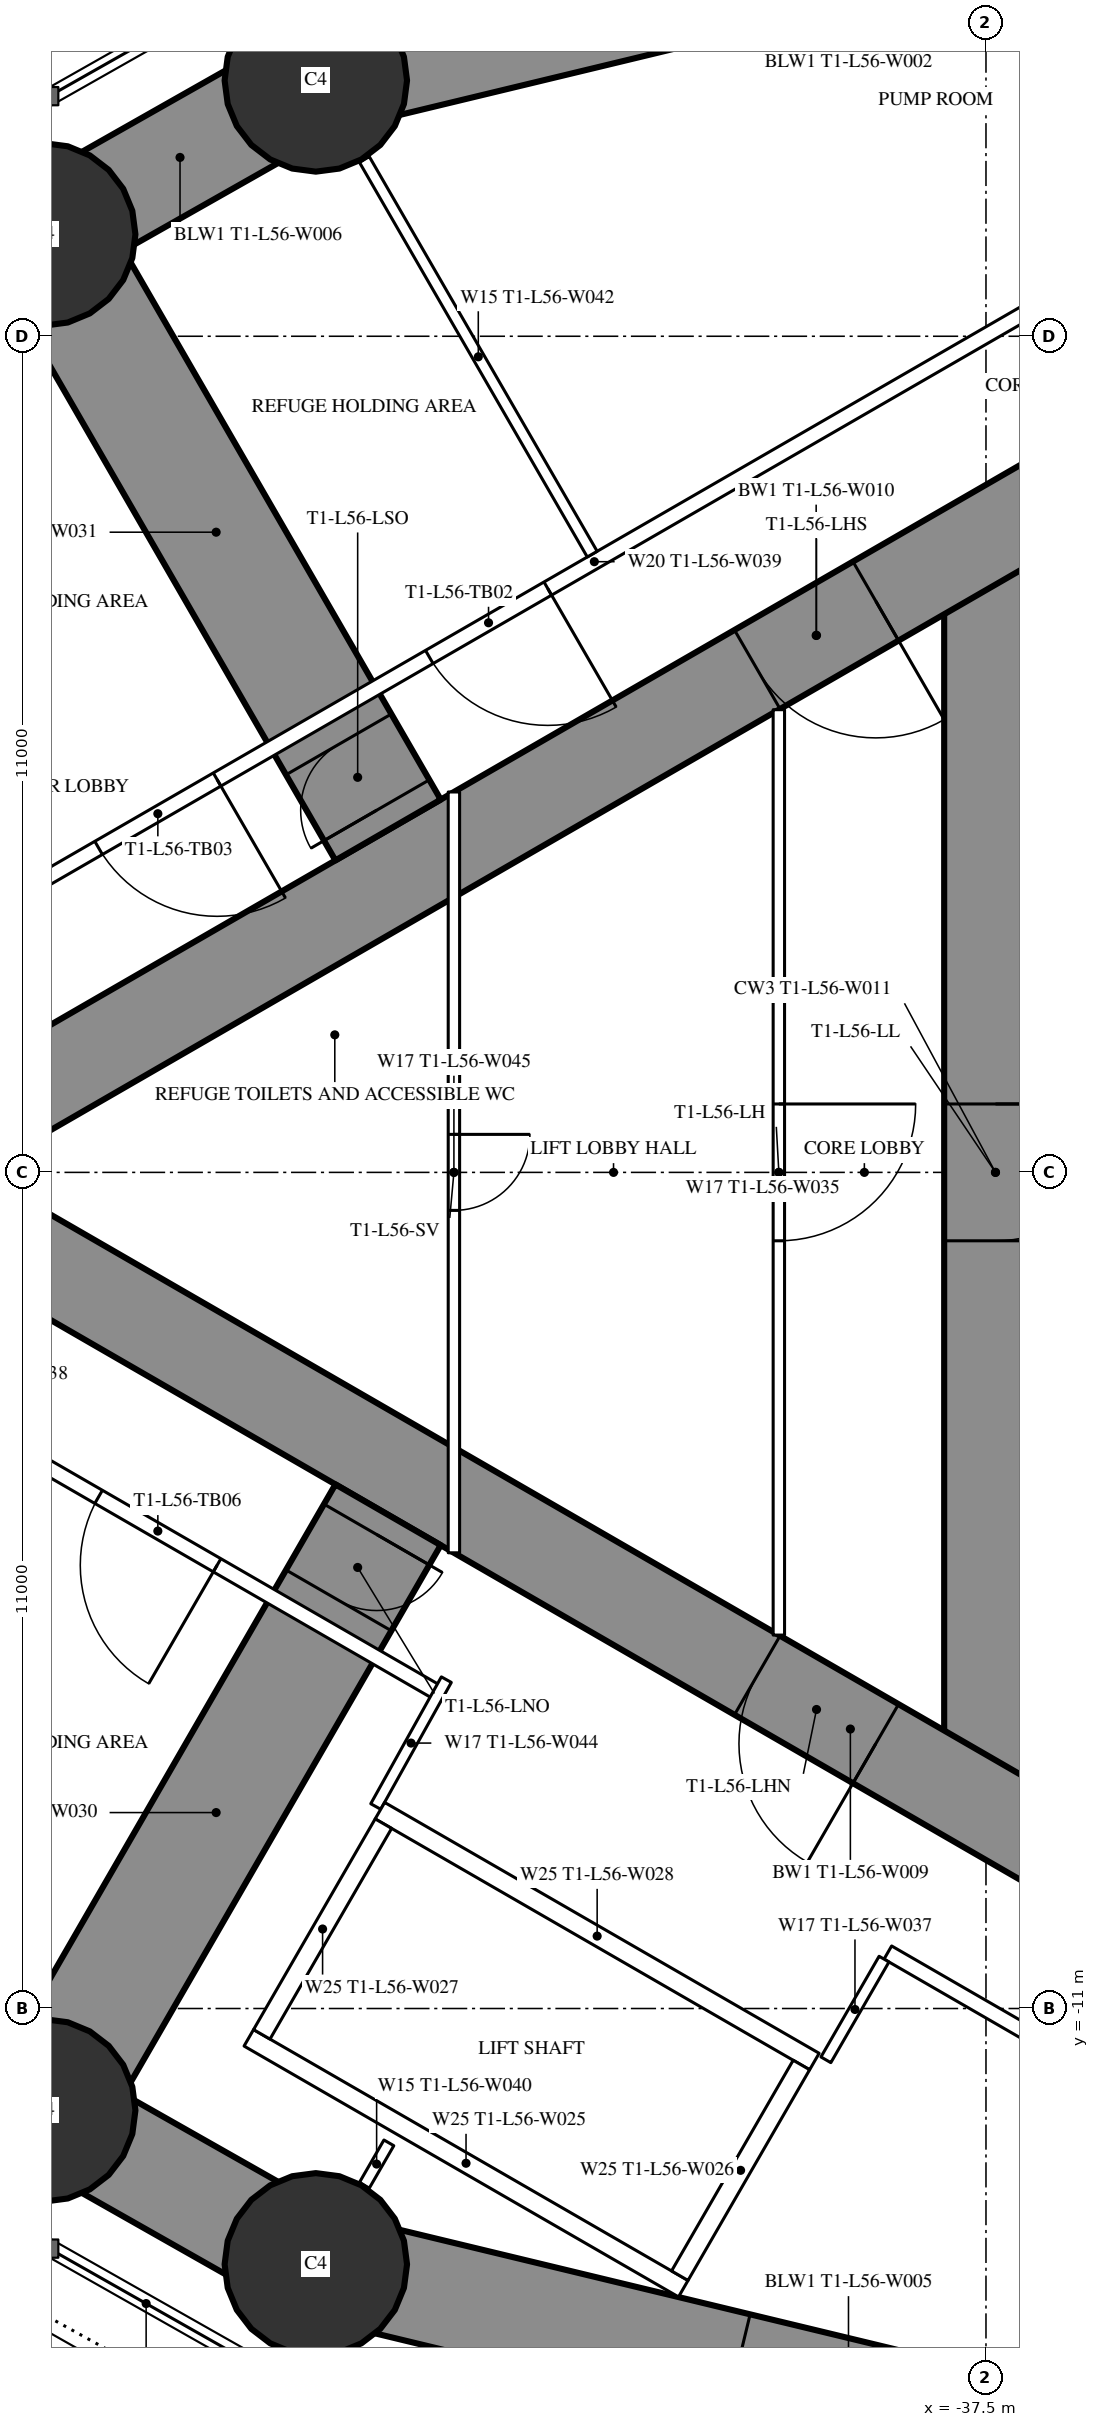
"""IFC4 building model, lengths in metres.
Left out: names, types, materials, properties, quantities, classifications, styles, units other than length and angle.
Written with IfcOpenShell. Run it as: python <this file> out.ifc"""

import sys

from ifc_helpers import new_model, si_unit, direction, frame, frame_2d, origin, origin_2d, place, context, subcontext, project, spatial, rectangle, circle, extrude, element, fill, save


model = new_model("IFC4")
c1 = context("Model", 3, precision=1e-05, world=origin(), true_north=direction((0.0, 1.0)))
c2 = subcontext(c1, "Body", "Model", "MODEL_VIEW")
j1 = project(units=[si_unit("LENGTHUNIT", "METRE"), si_unit("PLANEANGLEUNIT", "RADIAN")], contexts=[c1])
p1 = place(None, origin())
s1 = spatial("IfcSite", under=j1, at=p1, CompositionType="ELEMENT")
p2 = place(p1, origin())
s2 = spatial("IfcBuilding", under=s1, at=p2, CompositionType="ELEMENT")
p3 = place(p2, frame((0.0, 0.0, 210.3)))
s3 = spatial("IfcBuildingStorey", under=s2, at=p3, CompositionType="ELEMENT", Elevation=210.3)
for number, where, z_axis, x_axis in (
    (1, (-49.89, -12.34, 0.0), (0.0, 0.0, 1.0), (1.0, 0.0, 0.0)),
    (2, (-46.317, -14.365, 0.0), (0.0, 0.0, 1.0), (1.0, 0.0, 0.0)),
    (3, (-46.317, 14.365, 0.0), (0.0, 0.0, 1.0), (1.0, 0.0, 0.0)),
    (4, (-49.89, 12.34, 0.0), (0.0, 0.0, 1.0), (1.0, 0.0, 0.0)),
):
    element("IfcColumn", number, at=place(p3, frame(where, z_axis=z_axis, x_axis=x_axis)), inside=s3, PredefinedType="COLUMN", context=c2, shape_type="SweptSolid", body=[
        extrude(circle(Radius=1.2, at=origin_2d()), origin(), (0.0, 0.0, 1.0), 5.0),
    ])
p4 = place(p3, frame((-37.375, 8.6, 0.0), z_axis=(0.0, 0.0, 1.0), x_axis=(0.0, -1.0, 0.0)))
e5 = element("IfcWall", 5, at=p4, inside=s3, PredefinedType="SHEAR", context=c2, shape_type="SweptSolid", body=[
    extrude(rectangle(XDim=17.2, YDim=1.35, at=frame_2d((8.6, 0.0))), origin(), (0.0, 0.0, 1.0), 5.0),
])
p5 = place(p4, frame((7.7, 0.0, 0.0)))
e6 = element("IfcOpeningElement", 6, at=p5, cuts=e5, PredefinedType="OPENING", context=c2, shape_type="SweptSolid", body=[
    extrude(rectangle(XDim=1.8, YDim=2.2, at=frame_2d((0.9, 1.1))), frame((0.0, 0.685, 0.0), z_axis=(0.0, -1.0, 0.0), x_axis=(1.0, 0.0, 0.0)), (0.0, 0.0, 1.0), 1.37),
])
p6 = place(p3, frame((-27.2, 14.3, 0.0), z_axis=(0.0, 0.0, 1.0), x_axis=(-0.866026593062, -0.499997940104, 0.0)))
e7 = element("IfcWall", 7, at=p6, inside=s3, PredefinedType="SHEAR", context=c2, shape_type="SweptSolid", body=[
    extrude(rectangle(XDim=28.946, YDim=1.2, at=frame_2d((14.473, 0.0))), origin(), (0.0, 0.0, 1.0), 5.0),
])
p7 = place(p6, frame((6.5, 0.0, 0.0)))
e8 = element("IfcOpeningElement", 8, at=p7, cuts=e7, PredefinedType="OPENING", context=c2, shape_type="SweptSolid", body=[
    extrude(rectangle(XDim=1.0, YDim=2.2, at=frame_2d((0.5, 1.1))), frame((0.0, 0.61, 0.0), z_axis=(0.0, -1.0, 0.0), x_axis=(1.0, 0.0, 0.0)), (0.0, 0.0, 1.0), 1.22),
])
p8 = place(p6, frame((13.568, 0.0, 0.0)))
e9 = element("IfcOpeningElement", 9, at=p8, cuts=e7, PredefinedType="OPENING", context=c2, shape_type="SweptSolid", body=[
    extrude(rectangle(XDim=1.8, YDim=2.2, at=frame_2d((0.9, 1.1))), frame((0.0, 0.61, 0.0), z_axis=(0.0, -1.0, 0.0), x_axis=(1.0, 0.0, 0.0)), (0.0, 0.0, 1.0), 1.22),
])
p9 = place(p3, frame((-27.2, -14.3, 0.0), z_axis=(0.0, 0.0, 1.0), x_axis=(-0.866024021859, 0.500002393557, 0.0)))
e10 = element("IfcWall", 10, at=p9, inside=s3, PredefinedType="SHEAR", context=c2, shape_type="SweptSolid", body=[
    extrude(rectangle(XDim=27.907, YDim=1.2, at=frame_2d((13.954, 0.0))), origin(), (0.0, 0.0, 1.0), 5.0),
])
p10 = place(p9, frame((6.5, 0.0, 0.0)))
e11 = element("IfcOpeningElement", 11, at=p10, cuts=e10, PredefinedType="OPENING", context=c2, shape_type="SweptSolid", body=[
    extrude(rectangle(XDim=1.0, YDim=2.2, at=frame_2d((0.5, 1.1))), frame((0.0, 0.61, 0.0), z_axis=(0.0, -1.0, 0.0), x_axis=(1.0, 0.0, 0.0)), (0.0, 0.0, 1.0), 1.22),
])
p11 = place(p9, frame((13.568, 0.0, 0.0)))
e12 = element("IfcOpeningElement", 12, at=p11, cuts=e10, PredefinedType="OPENING", context=c2, shape_type="SweptSolid", body=[
    extrude(rectangle(XDim=1.8, YDim=2.2, at=frame_2d((0.9, 1.1))), frame((0.0, 0.61, 0.0), z_axis=(0.0, -1.0, 0.0), x_axis=(1.0, 0.0, 0.0)), (0.0, 0.0, 1.0), 1.22),
])
p12 = place(p3, frame((-45.366, 4.504, 0.0), z_axis=(0.0, 0.0, 1.0), x_axis=(-0.499998848701, 0.866026068486, 0.0)))
e13 = element("IfcWall", 13, at=p12, inside=s3, PredefinedType="SHEAR", context=c2, shape_type="SweptSolid", body=[
    extrude(rectangle(XDim=9.048, YDim=1.6, at=frame_2d((4.524, 0.0))), origin(), (0.0, 0.0, 1.0), 5.0),
])
p13 = place(p12, frame((0.3, 0.0, 0.0)))
e14 = element("IfcOpeningElement", 14, at=p13, cuts=e13, PredefinedType="OPENING", context=c2, shape_type="SweptSolid", body=[
    extrude(rectangle(XDim=1.0, YDim=2.2, at=frame_2d((0.5, 1.1))), frame((0.0, 0.81, 0.0), z_axis=(0.0, -1.0, 0.0), x_axis=(1.0, 0.0, 0.0)), (0.0, 0.0, 1.0), 1.62),
])
p14 = place(p3, frame((-45.366, -4.504, 0.0), z_axis=(0.0, 0.0, 1.0), x_axis=(-0.499998848701, -0.866026068486, 0.0)))
e15 = element("IfcWall", 15, at=p14, inside=s3, PredefinedType="SHEAR", context=c2, shape_type="SweptSolid", body=[
    extrude(rectangle(XDim=9.048, YDim=1.6, at=frame_2d((4.524, 0.0))), origin(), (0.0, 0.0, 1.0), 5.0),
])
p15 = place(p14, frame((0.3, 0.0, 0.0)))
e16 = element("IfcOpeningElement", 16, at=p15, cuts=e15, PredefinedType="OPENING", context=c2, shape_type="SweptSolid", body=[
    extrude(rectangle(XDim=1.0, YDim=2.2, at=frame_2d((0.5, 1.1))), frame((0.0, 0.81, 0.0), z_axis=(0.0, -1.0, 0.0), x_axis=(1.0, 0.0, 0.0)), (0.0, 0.0, 1.0), 1.62),
])
p16 = place(p3, frame((-32.301, 17.745, 0.0), z_axis=(0.0, 0.0, 1.0), x_axis=(-0.972132796948, -0.234430853556, 0.0)))
e17 = element("IfcWall", 17, at=p16, inside=s3, PredefinedType="SHEAR", context=c2, shape_type="SweptSolid", body=[
    extrude(rectangle(XDim=14.417, YDim=1.4, at=frame_2d((7.209, 0.0))), origin(), (0.0, 0.0, 1.0), 5.0),
])
p17 = place(p16, frame((5.709, 0.0, 0.6)))
e18 = element("IfcOpeningElement", 18, at=p17, cuts=e17, PredefinedType="OPENING", context=c2, shape_type="SweptSolid", body=[
    extrude(rectangle(XDim=3.0, YDim=1.2, at=frame_2d((1.5, 0.6))), frame((0.0, 0.71, 0.0), z_axis=(0.0, -1.0, 0.0), x_axis=(1.0, 0.0, 0.0)), (0.0, 0.0, 1.0), 1.42),
])
for number, where, z_axis, x_axis in (
    (19, (-46.317, 14.365, 0.0), (0.0, 0.0, 1.0), (-0.87, -0.493, 0.0)),
    (20, (-49.89, 12.34, 0.0), (0.0, 0.0, 1.0), (-0.856, -0.516, 0.0)),
    (21, (-53.408, -10.219, 0.0), (0.0, 0.0, 1.0), (0.856, -0.516, 0.0)),
    (22, (-49.89, -12.34, 0.0), (0.0, 0.0, 1.0), (0.87, -0.493, 0.0)),
):
    element("IfcWall", number, at=place(p3, frame(where, z_axis=z_axis, x_axis=x_axis)), inside=s3, PredefinedType="SHEAR", context=c2, shape_type="SweptSolid", body=[
        extrude(rectangle(XDim=4.108, YDim=1.4, at=frame_2d((2.054, 0.0))), origin(), (0.0, 0.0, 1.0), 5.0),
    ])
p18 = place(p3, frame((-46.317, -14.365, 0.0), z_axis=(0.0, 0.0, 1.0), x_axis=(0.972132796948, -0.234430853556, 0.0)))
e23 = element("IfcWall", 23, at=p18, inside=s3, PredefinedType="SHEAR", context=c2, shape_type="SweptSolid", body=[
    extrude(rectangle(XDim=14.417, YDim=1.4, at=frame_2d((7.209, 0.0))), origin(), (0.0, 0.0, 1.0), 5.0),
])
p19 = place(p18, frame((5.709, 0.0, 0.6)))
e24 = element("IfcOpeningElement", 24, at=p19, cuts=e23, PredefinedType="OPENING", context=c2, shape_type="SweptSolid", body=[
    extrude(rectangle(XDim=3.0, YDim=1.2, at=frame_2d((1.5, 0.6))), frame((0.0, 0.71, 0.0), z_axis=(0.0, -1.0, 0.0), x_axis=(1.0, 0.0, 0.0)), (0.0, 0.0, 1.0), 1.42),
])
p20 = place(p3, frame((-28.737, 16.068, 0.0), z_axis=(0.0, 0.0, 1.0), x_axis=(-0.866026057212, -0.499998868229, 0.0)))
e25 = element("IfcWall", 25, at=p20, inside=s3, PredefinedType="PARTITIONING", context=c2, shape_type="SweptSolid", body=[
    extrude(rectangle(XDim=32.137, YDim=0.2, at=frame_2d((16.068, 0.0))), origin(), (0.0, 0.0, 1.0), 4.75),
])
p21 = place(p20, frame((7.134, 0.0, 0.0)))
e26 = element("IfcOpeningElement", 26, at=p21, cuts=e25, PredefinedType="OPENING", context=c2, shape_type="SweptSolid", body=[
    extrude(rectangle(XDim=2.0, YDim=2.4, at=frame_2d((1.0, 1.2))), frame((0.0, 0.11, 0.0), z_axis=(0.0, -1.0, 0.0), x_axis=(1.0, 0.0, 0.0)), (0.0, 0.0, 1.0), 0.22),
])
p22 = place(p20, frame((16.776, 0.0, 0.0)))
e27 = element("IfcOpeningElement", 27, at=p22, cuts=e25, PredefinedType="OPENING", context=c2, shape_type="SweptSolid", body=[
    extrude(rectangle(XDim=1.8, YDim=2.2, at=frame_2d((0.9, 1.1))), frame((0.0, 0.11, 0.0), z_axis=(0.0, -1.0, 0.0), x_axis=(1.0, 0.0, 0.0)), (0.0, 0.0, 1.0), 0.22),
])
p23 = place(p20, frame((21.799, 0.0, 0.0)))
e28 = element("IfcOpeningElement", 28, at=p23, cuts=e25, PredefinedType="OPENING", context=c2, shape_type="SweptSolid", body=[
    extrude(rectangle(XDim=1.8, YDim=2.2, at=frame_2d((0.9, 1.1))), frame((0.0, 0.11, 0.0), z_axis=(0.0, -1.0, 0.0), x_axis=(1.0, 0.0, 0.0)), (0.0, 0.0, 1.0), 0.22),
])
p24 = place(p20, frame((26.575, 0.0, 0.0)))
e29 = element("IfcOpeningElement", 29, at=p24, cuts=e25, PredefinedType="OPENING", context=c2, shape_type="SweptSolid", body=[
    extrude(rectangle(XDim=1.8, YDim=2.2, at=frame_2d((0.9, 1.1))), frame((0.0, 0.11, 0.0), z_axis=(0.0, -1.0, 0.0), x_axis=(1.0, 0.0, 0.0)), (0.0, 0.0, 1.0), 0.22),
])
p25 = place(p3, frame((-42.68, 8.134, 0.0), z_axis=(0.0, 0.0, 1.0), x_axis=(-0.499984479505, 0.866034364361, 0.0)))
e30 = element("IfcWall", 30, at=p25, inside=s3, PredefinedType="PARTITIONING", context=c2, shape_type="SweptSolid", body=[
    extrude(rectangle(XDim=5.995, YDim=0.15, at=frame_2d((2.998, 0.0))), origin(), (0.0, 0.0, 1.0), 3.85),
])
p26 = place(p3, frame((-45.356, -12.767, 0.0), z_axis=(0.0, 0.0, 1.0), x_axis=(-0.499886366516, -0.866091000168, 0.0)))
e31 = element("IfcWall", 31, at=p26, inside=s3, PredefinedType="PARTITIONING", context=c2, shape_type="SweptSolid", body=[
    extrude(rectangle(XDim=0.645, YDim=0.15, at=frame_2d((0.322, 0.0))), origin(), (0.0, 0.0, 1.0), 4.75),
])
p27 = place(p3, frame((-28.737, -16.068, 0.0), z_axis=(0.0, 0.0, 1.0), x_axis=(-0.866029399323, 0.49999307946, 0.0)))
e32 = element("IfcWall", 32, at=p27, inside=s3, PredefinedType="PARTITIONING", context=c2, shape_type="SweptSolid", body=[
    extrude(rectangle(XDim=11.61, YDim=0.2, at=frame_2d((5.805, 0.0))), origin(), (0.0, 0.0, 1.0), 4.75),
])
p28 = place(p27, frame((4.905, 0.0, 0.0)))
e33 = element("IfcOpeningElement", 33, at=p28, cuts=e32, PredefinedType="OPENING", context=c2, shape_type="SweptSolid", body=[
    extrude(rectangle(XDim=1.8, YDim=2.2, at=frame_2d((0.9, 1.1))), frame((0.0, 0.11, 0.0), z_axis=(0.0, -1.0, 0.0), x_axis=(1.0, 0.0, 0.0)), (0.0, 0.0, 1.0), 0.22),
])
p29 = place(p3, frame((-44.715, -6.844, 0.0), z_axis=(0.0, 0.0, 1.0), x_axis=(-0.866025261224, 0.500000246922, 0.0)))
e34 = element("IfcWall", 34, at=p29, inside=s3, PredefinedType="PARTITIONING", context=c2, shape_type="SweptSolid", body=[
    extrude(rectangle(XDim=13.567, YDim=0.2, at=frame_2d((6.783, 0.0))), origin(), (0.0, 0.0, 1.0), 4.75),
])
p30 = place(p29, frame((7.925, 0.0, 0.0)))
e35 = element("IfcOpeningElement", 35, at=p30, cuts=e34, PredefinedType="OPENING", context=c2, shape_type="SweptSolid", body=[
    extrude(rectangle(XDim=2.0, YDim=2.4, at=frame_2d((1.0, 1.2))), frame((0.0, 0.11, 0.0), z_axis=(0.0, -1.0, 0.0), x_axis=(1.0, 0.0, 0.0)), (0.0, 0.0, 1.0), 0.22),
])
p31 = place(p29, frame((3.349, 0.0, 0.0)))
e36 = element("IfcOpeningElement", 36, at=p31, cuts=e34, PredefinedType="OPENING", context=c2, shape_type="SweptSolid", body=[
    extrude(rectangle(XDim=1.8, YDim=2.2, at=frame_2d((0.9, 1.1))), frame((0.0, 0.11, 0.0), z_axis=(0.0, -1.0, 0.0), x_axis=(1.0, 0.0, 0.0)), (0.0, 0.0, 1.0), 0.22),
])
p32 = place(p3, frame((-44.6, -6.673, 0.0), z_axis=(0.0, 0.0, 1.0), x_axis=(-0.486293872994, -0.873795324483, 0.0)))
e37 = element("IfcWall", 37, at=p32, inside=s3, PredefinedType="PARTITIONING", context=c2, shape_type="SweptSolid", body=[
    extrude(rectangle(XDim=1.91, YDim=0.15, at=frame_2d((0.955, 0.0))), origin(), (0.0, 0.0, 1.0), 4.75),
])
p33 = place(p3, frame((-38.841, -10.35, 0.0), z_axis=(0.0, 0.0, 1.0), x_axis=(-0.499966498333, -0.866044745117, 0.0)))
e38 = element("IfcWall", 38, at=p33, inside=s3, PredefinedType="PARTITIONING", context=c2, shape_type="SweptSolid", body=[
    extrude(rectangle(XDim=1.53, YDim=0.15, at=frame_2d((0.765, 0.0))), origin(), (0.0, 0.0, 1.0), 4.75),
])
p34 = place(p3, frame((-40.225, 6.087, 0.0), z_axis=(0.0, 0.0, 1.0), x_axis=(0.0, -1.0, 0.0)))
e39 = element("IfcWall", 39, at=p34, inside=s3, PredefinedType="PARTITIONING", context=c2, shape_type="SweptSolid", body=[
    extrude(rectangle(XDim=12.174, YDim=0.15, at=frame_2d((6.087, 0.0))), origin(), (0.0, 0.0, 1.0), 4.75),
])
p35 = place(p34, frame((5.187, 0.0, 0.0)))
e40 = element("IfcOpeningElement", 40, at=p35, cuts=e39, PredefinedType="OPENING", context=c2, shape_type="SweptSolid", body=[
    extrude(rectangle(XDim=1.8, YDim=2.2, at=frame_2d((0.9, 1.1))), frame((0.0, 0.085, 0.0), z_axis=(0.0, -1.0, 0.0), x_axis=(1.0, 0.0, 0.0)), (0.0, 0.0, 1.0), 0.17),
])
p36 = place(p3, frame((-44.5, 5.005, 0.0), z_axis=(0.0, 0.0, 1.0), x_axis=(0.0, -1.0, 0.0)))
e41 = element("IfcWall", 41, at=p36, inside=s3, PredefinedType="PARTITIONING", context=c2, shape_type="SweptSolid", body=[
    extrude(rectangle(XDim=10.009, YDim=0.15, at=frame_2d((5.005, 0.0))), origin(), (0.0, 0.0, 1.0), 4.75),
])
p37 = place(p36, frame((4.505, 0.0, 0.0)))
e42 = element("IfcOpeningElement", 42, at=p37, cuts=e41, PredefinedType="OPENING", context=c2, shape_type="SweptSolid", body=[
    extrude(rectangle(XDim=1.0, YDim=2.2, at=frame_2d((0.5, 1.1))), frame((0.0, 0.085, 0.0), z_axis=(0.0, -1.0, 0.0), x_axis=(1.0, 0.0, 0.0)), (0.0, 0.0, 1.0), 0.17),
])
p38 = place(p3, frame((-39.758, -11.697, 0.0), z_axis=(0.0, 0.0, 1.0), x_axis=(-0.866024194504, 0.500002094529, 0.0)))
e43 = element("IfcWall", 43, at=p38, inside=s3, PredefinedType="PARTITIONING", context=c2, shape_type="SweptSolid", body=[
    extrude(rectangle(XDim=6.6, YDim=0.25, at=frame_2d((3.3, 0.0))), origin(), (0.0, 0.0, 1.0), 4.75),
])
p39 = place(p3, frame((-41.482, -14.686, 0.0), z_axis=(0.0, 0.0, 1.0), x_axis=(-0.86603344179, 0.499986077507, 0.0)))
e44 = element("IfcWall", 44, at=p39, inside=s3, PredefinedType="PARTITIONING", context=c2, shape_type="SweptSolid", body=[
    extrude(rectangle(XDim=6.6, YDim=0.25, at=frame_2d((3.3, 0.0))), origin(), (0.0, 0.0, 1.0), 4.75),
])
for number, where, z_axis, x_axis in (
    (45, (-39.928, -11.743, 0.0), (0.0, 0.0, 1.0), (-0.5, -0.866, 0.0)),
    (46, (-45.428, -8.568, 0.0), (0.0, 0.0, 1.0), (-0.5, -0.866, 0.0)),
):
    element("IfcWall", number, at=place(p3, frame(where, z_axis=z_axis, x_axis=x_axis)), inside=s3, PredefinedType="PARTITIONING", context=c2, shape_type="SweptSolid", body=[
        extrude(rectangle(XDim=3.201, YDim=0.25, at=frame_2d((1.6, 0.0))), origin(), (0.0, 0.0, 1.0), 4.75),
    ])
p40 = place(p13, origin())
e47 = element("IfcDoor", 47, at=p40, inside=s3, OperationType="SINGLE_SWING_LEFT", PredefinedType="DOOR", context=c2, shape_type="SweptSolid", body=[
    extrude(rectangle(XDim=1.0, YDim=2.2, at=frame_2d((0.5, 1.1))), frame((0.0, 0.025, 0.0), z_axis=(0.0, -1.0, 0.0), x_axis=(1.0, 0.0, 0.0)), (0.0, 0.0, 1.0), 0.05),
])
fill(e14, e47)
p41 = place(p15, origin())
e48 = element("IfcDoor", 48, at=p41, inside=s3, OperationType="SINGLE_SWING_LEFT", PredefinedType="DOOR", context=c2, shape_type="SweptSolid", body=[
    extrude(rectangle(XDim=1.0, YDim=2.2, at=frame_2d((0.5, 1.1))), frame((0.0, 0.025, 0.0), z_axis=(0.0, -1.0, 0.0), x_axis=(1.0, 0.0, 0.0)), (0.0, 0.0, 1.0), 0.05),
])
fill(e16, e48)
p42 = place(p22, origin())
e49 = element("IfcDoor", 49, at=p42, inside=s3, OperationType="DOUBLE_DOOR_SINGLE_SWING", PredefinedType="DOOR", context=c2, shape_type="SweptSolid", body=[
    extrude(rectangle(XDim=1.8, YDim=2.2, at=frame_2d((0.9, 1.1))), frame((0.0, 0.025, 0.0), z_axis=(0.0, -1.0, 0.0), x_axis=(1.0, 0.0, 0.0)), (0.0, 0.0, 1.0), 0.05),
])
fill(e27, e49)
p43 = place(p23, origin())
e50 = element("IfcDoor", 50, at=p43, inside=s3, OperationType="DOUBLE_DOOR_SINGLE_SWING", PredefinedType="DOOR", context=c2, shape_type="SweptSolid", body=[
    extrude(rectangle(XDim=1.8, YDim=2.2, at=frame_2d((0.9, 1.1))), frame((0.0, 0.025, 0.0), z_axis=(0.0, -1.0, 0.0), x_axis=(1.0, 0.0, 0.0)), (0.0, 0.0, 1.0), 0.05),
])
fill(e28, e50)
p44 = place(p31, origin())
e51 = element("IfcDoor", 51, at=p44, inside=s3, OperationType="DOUBLE_DOOR_SINGLE_SWING", PredefinedType="DOOR", context=c2, shape_type="SweptSolid", body=[
    extrude(rectangle(XDim=1.8, YDim=2.2, at=frame_2d((0.9, 1.1))), frame((0.0, 0.025, 0.0), z_axis=(0.0, -1.0, 0.0), x_axis=(1.0, 0.0, 0.0)), (0.0, 0.0, 1.0), 0.05),
])
fill(e36, e51)
p45 = place(p35, origin())
e52 = element("IfcDoor", 52, at=p45, inside=s3, OperationType="DOUBLE_DOOR_SINGLE_SWING", PredefinedType="DOOR", context=c2, shape_type="SweptSolid", body=[
    extrude(rectangle(XDim=1.8, YDim=2.2, at=frame_2d((0.9, 1.1))), frame((0.0, 0.025, 0.0), z_axis=(0.0, -1.0, 0.0), x_axis=(1.0, 0.0, 0.0)), (0.0, 0.0, 1.0), 0.05),
])
fill(e40, e52)
p46 = place(p37, origin())
e53 = element("IfcDoor", 53, at=p46, inside=s3, OperationType="SINGLE_SWING_LEFT", PredefinedType="DOOR", context=c2, shape_type="SweptSolid", body=[
    extrude(rectangle(XDim=1.0, YDim=2.2, at=frame_2d((0.5, 1.1))), frame((0.0, 0.025, 0.0), z_axis=(0.0, -1.0, 0.0), x_axis=(1.0, 0.0, 0.0)), (0.0, 0.0, 1.0), 0.05),
])
fill(e42, e53)
p47 = place(p8, origin())
e54 = element("IfcDoor", 54, at=p47, inside=s3, OperationType="DOUBLE_DOOR_SINGLE_SWING", PredefinedType="DOOR", context=c2, shape_type="SweptSolid", body=[
    extrude(rectangle(XDim=1.8, YDim=2.2, at=frame_2d((0.9, 1.1))), frame((0.0, 0.025, 0.0), z_axis=(0.0, -1.0, 0.0), x_axis=(1.0, 0.0, 0.0)), (0.0, 0.0, 1.0), 0.05),
])
fill(e9, e54)
p48 = place(p11, origin())
e55 = element("IfcDoor", 55, at=p48, inside=s3, OperationType="DOUBLE_DOOR_SINGLE_SWING", PredefinedType="DOOR", context=c2, shape_type="SweptSolid", body=[
    extrude(rectangle(XDim=1.8, YDim=2.2, at=frame_2d((0.9, 1.1))), frame((0.0, 0.025, 0.0), z_axis=(0.0, -1.0, 0.0), x_axis=(1.0, 0.0, 0.0)), (0.0, 0.0, 1.0), 0.05),
])
fill(e12, e55)
p49 = place(p5, origin())
e56 = element("IfcDoor", 56, at=p49, inside=s3, OperationType="DOUBLE_DOOR_SINGLE_SWING", PredefinedType="DOOR", context=c2, shape_type="SweptSolid", body=[
    extrude(rectangle(XDim=1.8, YDim=2.2, at=frame_2d((0.9, 1.1))), frame((0.0, 0.025, 0.0), z_axis=(0.0, -1.0, 0.0), x_axis=(1.0, 0.0, 0.0)), (0.0, 0.0, 1.0), 0.05),
])
fill(e6, e56)
save(model, sys.argv[1])
